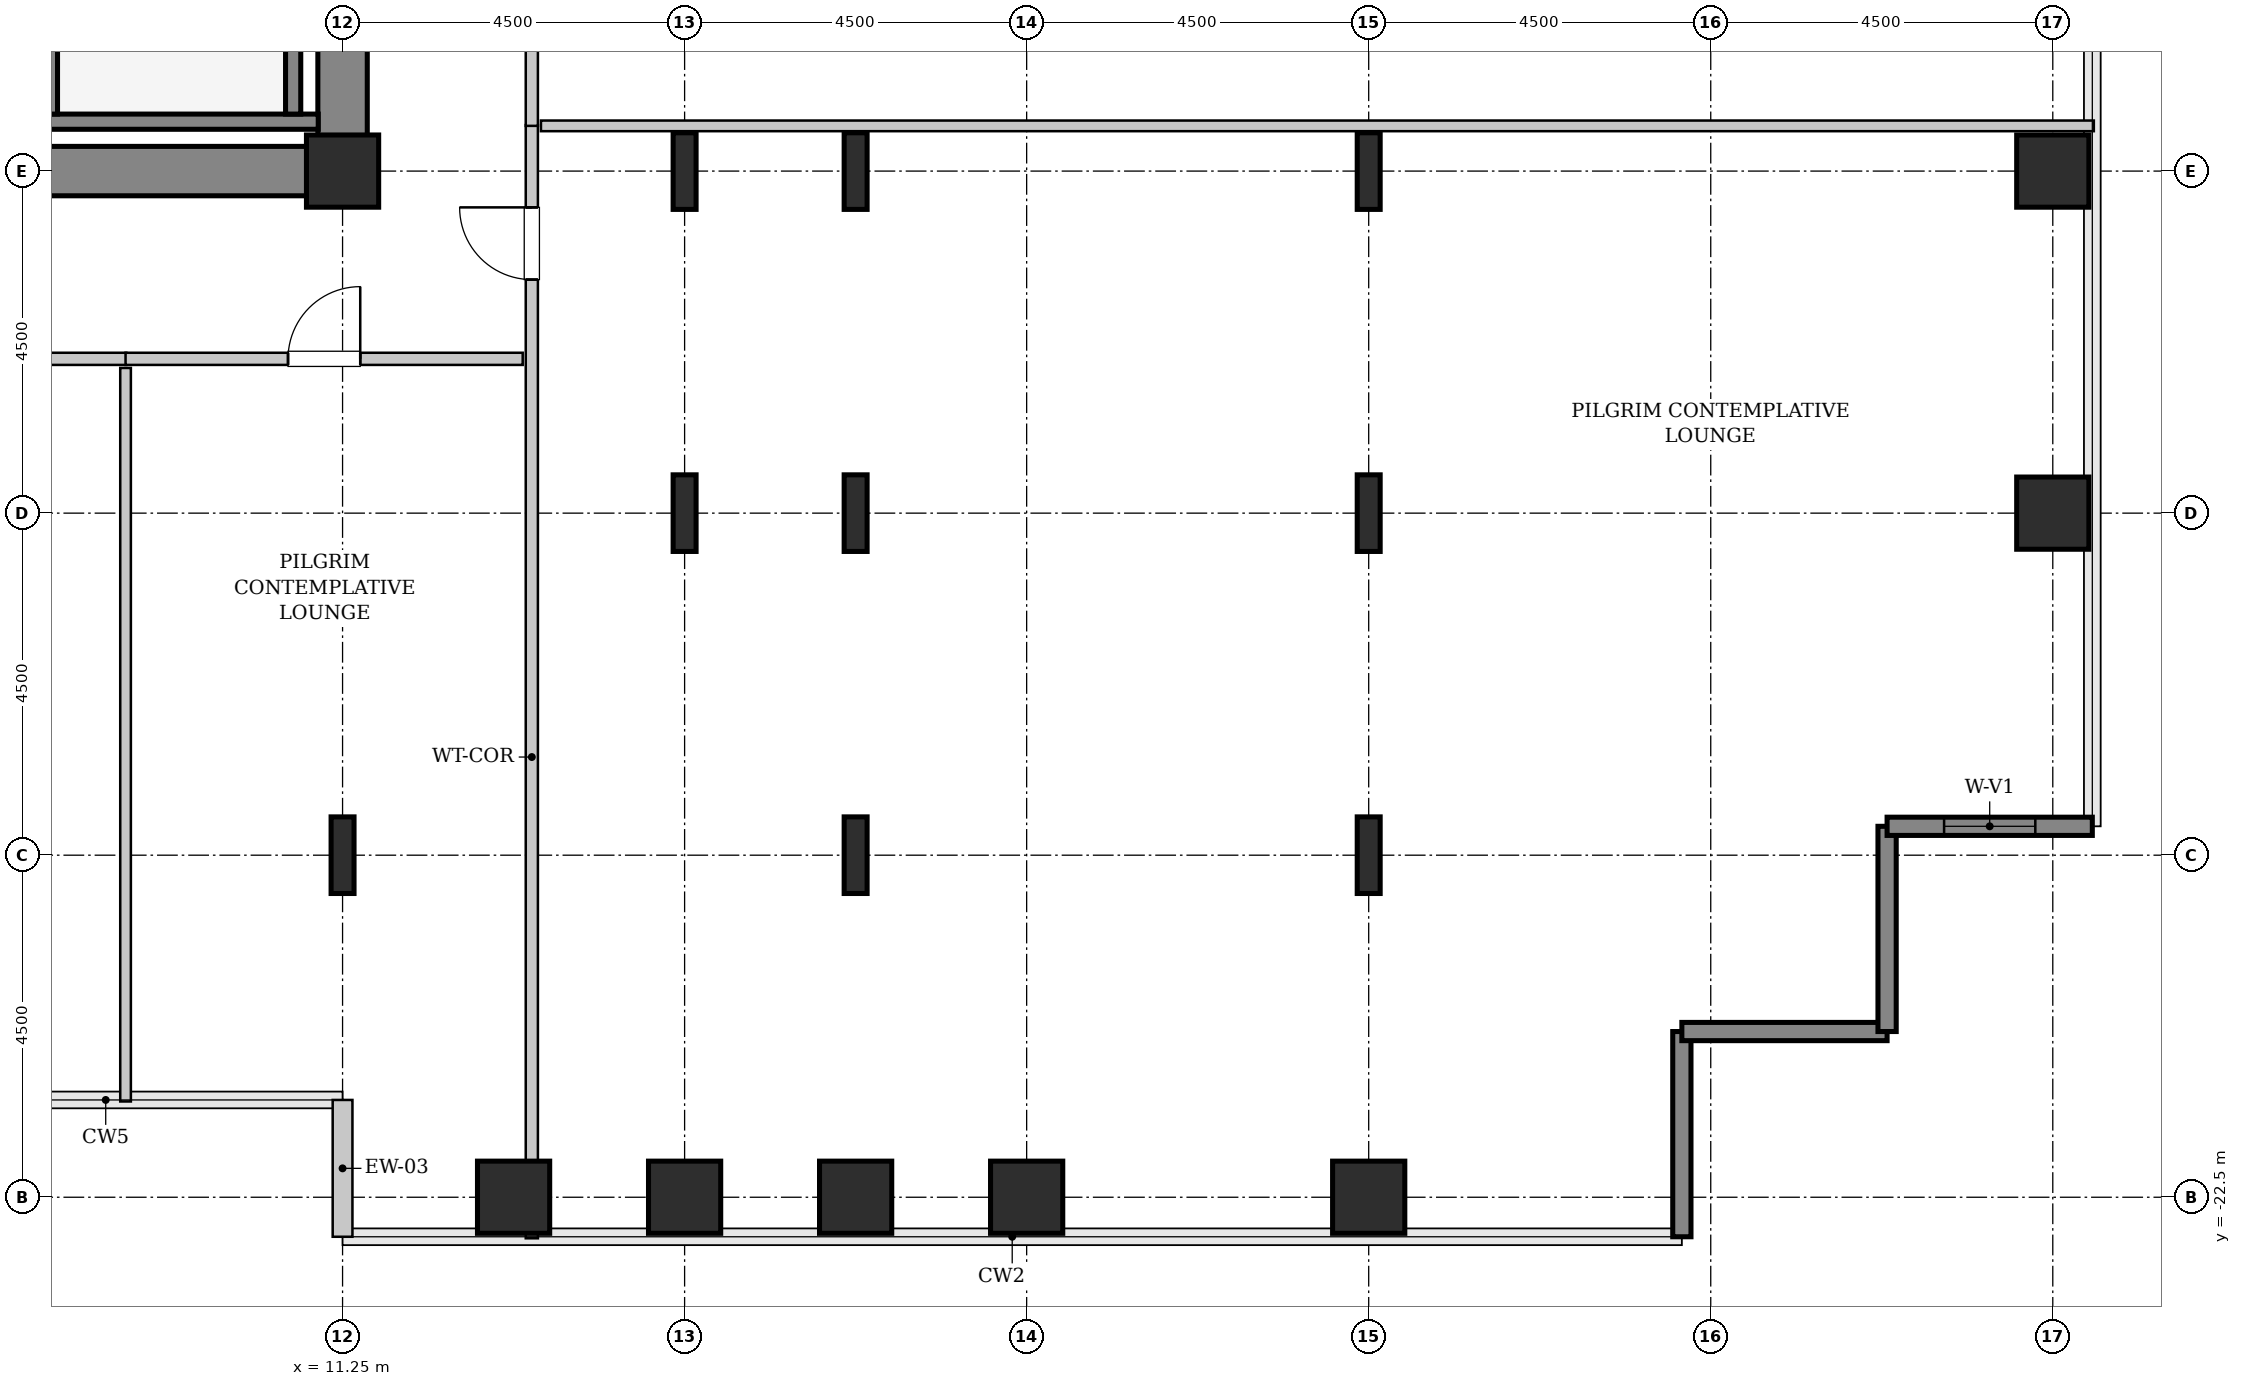
"""IFC4 building model, lengths in metres.
Left out: names, types, materials, properties, quantities, classifications, styles, units other than length and angle.
Written with IfcOpenShell. Run it as: python <this file> out.ifc"""

import sys

from ifc_helpers import new_model, si_unit, direction, frame, frame_2d, origin, origin_2d, place, context, subcontext, project, spatial, rectangle, hollow_rectangle, i_section, extrude, source, transform, mapped, element, fill, save


model = new_model("IFC4")
c1 = context("Model", 3, precision=1e-05, world=origin(), true_north=direction((0.0, 1.0)))
c2 = subcontext(c1, "Body", "Model", "MODEL_VIEW")
j1 = project(units=[si_unit("LENGTHUNIT", "METRE"), si_unit("PLANEANGLEUNIT", "RADIAN")], contexts=[c1])
p1 = place(None, origin())
s1 = spatial("IfcSite", under=j1, at=p1, CompositionType="ELEMENT")
p2 = place(p1, origin())
s2 = spatial("IfcBuilding", under=s1, at=p2, CompositionType="ELEMENT")
p3 = place(p2, frame((0.0, 0.0, 36.8)))
s3 = spatial("IfcBuildingStorey", under=s2, at=p3, CompositionType="ELEMENT", Elevation=36.8)
m1 = source(origin(), c2, "Body", "SweptSolid", [
    extrude(rectangle(XDim=10.025, YDim=0.65, at=frame_2d((5.012, 0.0))), origin(), (0.0, 0.0, 1.0), 3.8),
])
p4 = place(p3, frame((1.55, -9.0, 0.0), z_axis=(0.0, 0.0, 1.0), x_axis=(1.0, 0.0, 0.0)))
e1 = element("IfcWall", 1, at=p4, inside=s3, PredefinedType="SHEAR", context=c2, shape_type="MappedRepresentation", body=[
    mapped(m1, transform((0.0, 0.0, 0.0), x_axis=(1.0, 0.0, 0.0), y_axis=(0.0, 1.0, 0.0), z_axis=(0.0, 0.0, 1.0), scale=1.0)),
])
m2 = source(origin(), c2, "Body", "SweptSolid", [
    extrude(rectangle(XDim=7.325, YDim=0.65, at=frame_2d((3.663, 0.0))), origin(), (0.0, 0.0, 1.0), 3.8),
])
p5 = place(p3, frame((11.25, -8.675, 0.0), z_axis=(0.0, 0.0, 1.0), x_axis=(0.0, 1.0, 0.0)))
e2 = element("IfcWall", 2, at=p5, inside=s3, PredefinedType="SHEAR", context=c2, shape_type="MappedRepresentation", body=[
    mapped(m2, transform((0.0, 0.0, 0.0), x_axis=(1.0, 0.0, 0.0), y_axis=(0.0, 1.0, 0.0), z_axis=(0.0, 0.0, 1.0), scale=1.0)),
])
m3 = source(origin(), c2, "Body", "SweptSolid", [
    extrude(i_section(OverallWidth=0.302, OverallDepth=1.008, WebThickness=0.021, FlangeThickness=0.04, FilletRadius=0.03, at=origin_2d()), origin(), (0.0, 0.0, 1.0), 3.8),
])
p6 = place(p3, frame((11.25, -18.0, 0.0), z_axis=(0.0, 0.0, 1.0), x_axis=(1.0, 0.0, 0.0)))
e3 = element("IfcColumn", 3, at=p6, inside=s3, PredefinedType="COLUMN", context=c2, shape_type="MappedRepresentation", body=[
    mapped(m3, transform((0.0, 0.0, 0.0), x_axis=(1.0, 0.0, 0.0), y_axis=(0.0, 1.0, 0.0), z_axis=(0.0, 0.0, 1.0), scale=1.0)),
])
m4 = source(origin(), c2, "Body", "SweptSolid", [
    extrude(hollow_rectangle(XDim=0.95, YDim=0.95, WallThickness=0.045, InnerFilletRadius=0.045, OuterFilletRadius=0.09, at=origin_2d()), origin(), (0.0, 0.0, 1.0), 3.8),
])
p7 = place(p3, frame((11.25, -9.0, 0.0), z_axis=(0.0, 0.0, 1.0), x_axis=(1.0, 0.0, 0.0)))
e4 = element("IfcColumn", 4, at=p7, inside=s3, PredefinedType="COLUMN", context=c2, shape_type="MappedRepresentation", body=[
    mapped(m4, transform((0.0, 0.0, 0.0), x_axis=(1.0, 0.0, 0.0), y_axis=(0.0, 1.0, 0.0), z_axis=(0.0, 0.0, 1.0), scale=1.0)),
])
m5 = source(origin(), c2, "Body", "SweptSolid", [
    extrude(hollow_rectangle(XDim=0.95, YDim=0.95, WallThickness=0.045, InnerFilletRadius=0.045, OuterFilletRadius=0.09, at=origin_2d()), origin(), (0.0, 0.0, 1.0), 3.8),
])
for number, where, z_axis, x_axis in (
    (5, (13.5, -22.5, 0.0), (0.0, 0.0, 1.0), (1.0, 0.0, 0.0)),
    (6, (15.75, -22.5, 0.0), (0.0, 0.0, 1.0), (1.0, 0.0, 0.0)),
):
    element("IfcColumn", number, at=place(p3, frame(where, z_axis=z_axis, x_axis=x_axis)), inside=s3, PredefinedType="COLUMN", context=c2, shape_type="MappedRepresentation", body=[
        mapped(m5, transform((0.0, 0.0, 0.0), x_axis=(1.0, 0.0, 0.0), y_axis=(0.0, 1.0, 0.0), z_axis=(0.0, 0.0, 1.0), scale=1.0)),
    ])
for number, where, z_axis, x_axis in (
    (7, (15.75, -13.5, 0.0), (0.0, 0.0, 1.0), (1.0, 0.0, 0.0)),
    (8, (15.75, -9.0, 0.0), (0.0, 0.0, 1.0), (1.0, 0.0, 0.0)),
):
    element("IfcColumn", number, at=place(p3, frame(where, z_axis=z_axis, x_axis=x_axis)), inside=s3, PredefinedType="COLUMN", context=c2, shape_type="MappedRepresentation", body=[
        mapped(m3, transform((0.0, 0.0, 0.0), x_axis=(1.0, 0.0, 0.0), y_axis=(0.0, 1.0, 0.0), z_axis=(0.0, 0.0, 1.0), scale=1.0)),
    ])
p8 = place(p3, frame((18.0, -22.5, 0.0), z_axis=(0.0, 0.0, 1.0), x_axis=(1.0, 0.0, 0.0)))
e9 = element("IfcColumn", 9, at=p8, inside=s3, PredefinedType="COLUMN", context=c2, shape_type="MappedRepresentation", body=[
    mapped(m5, transform((0.0, 0.0, 0.0), x_axis=(1.0, 0.0, 0.0), y_axis=(0.0, 1.0, 0.0), z_axis=(0.0, 0.0, 1.0), scale=1.0)),
])
for number, where, z_axis, x_axis in (
    (10, (18.0, -18.0, 0.0), (0.0, 0.0, 1.0), (1.0, 0.0, 0.0)),
    (11, (18.0, -13.5, 0.0), (0.0, 0.0, 1.0), (1.0, 0.0, 0.0)),
    (12, (18.0, -9.0, 0.0), (0.0, 0.0, 1.0), (1.0, 0.0, 0.0)),
):
    element("IfcColumn", number, at=place(p3, frame(where, z_axis=z_axis, x_axis=x_axis)), inside=s3, PredefinedType="COLUMN", context=c2, shape_type="MappedRepresentation", body=[
        mapped(m3, transform((0.0, 0.0, 0.0), x_axis=(1.0, 0.0, 0.0), y_axis=(0.0, 1.0, 0.0), z_axis=(0.0, 0.0, 1.0), scale=1.0)),
    ])
for number, where, z_axis, x_axis in (
    (13, (20.25, -22.5, 0.0), (0.0, 0.0, 1.0), (1.0, 0.0, 0.0)),
    (14, (24.75, -22.5, 0.0), (0.0, 0.0, 1.0), (1.0, 0.0, 0.0)),
):
    element("IfcColumn", number, at=place(p3, frame(where, z_axis=z_axis, x_axis=x_axis)), inside=s3, PredefinedType="COLUMN", context=c2, shape_type="MappedRepresentation", body=[
        mapped(m5, transform((0.0, 0.0, 0.0), x_axis=(1.0, 0.0, 0.0), y_axis=(0.0, 1.0, 0.0), z_axis=(0.0, 0.0, 1.0), scale=1.0)),
    ])
for number, where, z_axis, x_axis in (
    (15, (24.75, -18.0, 0.0), (0.0, 0.0, 1.0), (1.0, 0.0, 0.0)),
    (16, (24.75, -13.5, 0.0), (0.0, 0.0, 1.0), (1.0, 0.0, 0.0)),
    (17, (24.75, -9.0, 0.0), (0.0, 0.0, 1.0), (1.0, 0.0, 0.0)),
):
    element("IfcColumn", number, at=place(p3, frame(where, z_axis=z_axis, x_axis=x_axis)), inside=s3, PredefinedType="COLUMN", context=c2, shape_type="MappedRepresentation", body=[
        mapped(m3, transform((0.0, 0.0, 0.0), x_axis=(1.0, 0.0, 0.0), y_axis=(0.0, 1.0, 0.0), z_axis=(0.0, 0.0, 1.0), scale=1.0)),
    ])
for number, where, z_axis, x_axis in (
    (18, (33.75, -13.5, 0.0), (0.0, 0.0, 1.0), (1.0, 0.0, 0.0)),
    (19, (33.75, -9.0, 0.0), (0.0, 0.0, 1.0), (1.0, 0.0, 0.0)),
):
    element("IfcColumn", number, at=place(p3, frame(where, z_axis=z_axis, x_axis=x_axis)), inside=s3, PredefinedType="COLUMN", context=c2, shape_type="MappedRepresentation", body=[
        mapped(m5, transform((0.0, 0.0, 0.0), x_axis=(1.0, 0.0, 0.0), y_axis=(0.0, 1.0, 0.0), z_axis=(0.0, 0.0, 1.0), scale=1.0)),
    ])
m6 = source(origin(), c2, "Body", "SweptSolid", [
    extrude(rectangle(XDim=1.8, YDim=0.26, at=frame_2d((0.9, 0.0))), origin(), (0.0, 0.0, 1.0), 3.55),
])
p9 = place(p3, frame((11.25, -21.22, 0.0), z_axis=(0.0, 0.0, 1.0), x_axis=(0.0, -1.0, 0.0)))
e20 = element("IfcWall", 20, at=p9, inside=s3, PredefinedType="SOLIDWALL", context=c2, shape_type="MappedRepresentation", body=[
    mapped(m6, transform((0.0, 0.0, 0.0), x_axis=(1.0, 0.0, 0.0), y_axis=(0.0, 1.0, 0.0), z_axis=(0.0, 0.0, 1.0), scale=1.0)),
])
m7 = source(origin(), c2, "Body", "SweptSolid", [
    extrude(rectangle(XDim=2.7, YDim=0.24, at=frame_2d((1.35, 0.0))), origin(), (0.0, 0.0, 1.0), 3.55),
])
for number, where, z_axis, x_axis in (
    (21, (28.87, -23.02, 0.0), (0.0, 0.0, 1.0), (0.0, 1.0, 0.0)),
    (22, (28.87, -20.32, 0.0), (0.0, 0.0, 1.0), (1.0, 0.0, 0.0)),
    (23, (31.57, -20.32, 0.0), (0.0, 0.0, 1.0), (0.0, 1.0, 0.0)),
):
    element("IfcWall", number, at=place(p3, frame(where, z_axis=z_axis, x_axis=x_axis)), inside=s3, PredefinedType="SHEAR", context=c2, shape_type="MappedRepresentation", body=[
        mapped(m7, transform((0.0, 0.0, 0.0), x_axis=(1.0, 0.0, 0.0), y_axis=(0.0, 1.0, 0.0), z_axis=(0.0, 0.0, 1.0), scale=1.0)),
    ])
p10 = place(p3, frame((31.57, -17.62, 0.0), z_axis=(0.0, 0.0, 1.0), x_axis=(1.0, 0.0, 0.0)))
e24 = element("IfcWall", 24, at=p10, inside=s3, PredefinedType="SHEAR", context=c2, shape_type="MappedRepresentation", body=[
    mapped(m7, transform((0.0, 0.0, 0.0), x_axis=(1.0, 0.0, 0.0), y_axis=(0.0, 1.0, 0.0), z_axis=(0.0, 0.0, 1.0), scale=1.0)),
])
p11 = place(p10, frame((0.75, 0.0, 0.85)))
e25 = element("IfcOpeningElement", 25, at=p11, cuts=e24, PredefinedType="OPENING", context=c2, shape_type="SweptSolid", body=[
    extrude(rectangle(XDim=1.2, YDim=1.8, at=frame_2d((0.6, 0.9))), frame((0.0, 0.13, 0.0), z_axis=(0.0, -1.0, 0.0), x_axis=(1.0, 0.0, 0.0)), (0.0, 0.0, 1.0), 0.26),
])
m8 = source(origin(), c2, "Body", "SweptSolid", [
    extrude(rectangle(XDim=3.63, YDim=0.2, at=frame_2d((1.815, 0.0))), origin(), (0.0, 0.0, 1.0), 3.8),
])
p12 = place(p3, frame((7.3, -8.35, 0.0), z_axis=(0.0, 0.0, 1.0), x_axis=(1.0, 0.0, 0.0)))
e26 = element("IfcWall", 26, at=p12, inside=s3, PredefinedType="SOLIDWALL", context=c2, shape_type="MappedRepresentation", body=[
    mapped(m8, transform((0.0, 0.0, 0.0), x_axis=(1.0, 0.0, 0.0), y_axis=(0.0, 1.0, 0.0), z_axis=(0.0, 0.0, 1.0), scale=1.0)),
])
m9 = source(origin(), c2, "Body", "SweptSolid", [
    extrude(rectangle(XDim=7.1, YDim=0.2, at=frame_2d((3.55, 0.0))), origin(), (0.0, 0.0, 1.0), 3.8),
])
p13 = place(p3, frame((7.4, -1.15, 0.0), z_axis=(0.0, 0.0, 1.0), x_axis=(0.0, -1.0, 0.0)))
e27 = element("IfcWall", 27, at=p13, inside=s3, PredefinedType="SOLIDWALL", context=c2, shape_type="MappedRepresentation", body=[
    mapped(m9, transform((0.0, 0.0, 0.0), x_axis=(1.0, 0.0, 0.0), y_axis=(0.0, 1.0, 0.0), z_axis=(0.0, 0.0, 1.0), scale=1.0)),
])
p14 = place(p13, frame((0.18, 0.0, 0.0)))
e28 = element("IfcOpeningElement", 28, at=p14, cuts=e27, PredefinedType="OPENING", context=c2, shape_type="SweptSolid", body=[
    extrude(rectangle(XDim=1.1, YDim=2.15, at=frame_2d((0.55, 1.075))), frame((0.0, 0.11, 0.0), z_axis=(0.0, -1.0, 0.0), x_axis=(1.0, 0.0, 0.0)), (0.0, 0.0, 1.0), 0.22),
])
p15 = place(p3, frame((10.6, -1.15, 0.0), z_axis=(0.0, 0.0, 1.0), x_axis=(0.0, -1.0, 0.0)))
e29 = element("IfcWall", 29, at=p15, inside=s3, PredefinedType="SOLIDWALL", context=c2, shape_type="MappedRepresentation", body=[
    mapped(m9, transform((0.0, 0.0, 0.0), x_axis=(1.0, 0.0, 0.0), y_axis=(0.0, 1.0, 0.0), z_axis=(0.0, 0.0, 1.0), scale=1.0)),
])
m10 = source(origin(), c2, "Body", "SweptSolid", [
    extrude(rectangle(XDim=14.645, YDim=0.16, at=frame_2d((7.323, 0.0))), origin(), (0.0, 0.0, 1.0), 3.535),
])
p16 = place(p3, frame((13.74, -23.04, 0.0), z_axis=(0.0, 0.0, 1.0), x_axis=(0.0, 1.0, 0.0)))
e30 = element("IfcWall", 30, at=p16, inside=s3, PredefinedType="PARTITIONING", context=c2, shape_type="MappedRepresentation", body=[
    mapped(m10, transform((0.0, 0.0, 0.0), x_axis=(1.0, 0.0, 0.0), y_axis=(0.0, 1.0, 0.0), z_axis=(0.0, 0.0, 1.0), scale=1.0)),
])
p17 = place(p16, frame((12.613, 0.0, 0.0)))
e31 = element("IfcOpeningElement", 31, at=p17, cuts=e30, PredefinedType="OPENING", context=c2, shape_type="SweptSolid", body=[
    extrude(rectangle(XDim=0.95, YDim=2.1, at=frame_2d((0.475, 1.05))), frame((0.0, 0.09, 0.0), z_axis=(0.0, -1.0, 0.0), x_axis=(1.0, 0.0, 0.0)), (0.0, 0.0, 1.0), 0.18),
])
m11 = source(origin(), c2, "Body", "SweptSolid", [
    extrude(rectangle(XDim=20.43, YDim=0.14, at=frame_2d((10.215, 0.0))), origin(), (0.0, 0.0, 1.0), 3.535),
])
p18 = place(p3, frame((13.86, -8.405, 0.0), z_axis=(0.0, 0.0, 1.0), x_axis=(1.0, 0.0, 0.0)))
e32 = element("IfcWall", 32, at=p18, inside=s3, PredefinedType="PARTITIONING", context=c2, shape_type="MappedRepresentation", body=[
    mapped(m11, transform((0.0, 0.0, 0.0), x_axis=(1.0, 0.0, 0.0), y_axis=(0.0, 1.0, 0.0), z_axis=(0.0, 0.0, 1.0), scale=1.0)),
])
m12 = source(origin(), c2, "Body", "SweptSolid", [
    extrude(rectangle(XDim=3.61, YDim=0.16, at=frame_2d((1.805, 0.0))), origin(), (0.0, 0.0, 1.0), 3.535),
])
p19 = place(p3, frame((13.74, -8.405, 0.0), z_axis=(0.0, 0.0, 1.0), x_axis=(0.0, 1.0, 0.0)))
e33 = element("IfcWall", 33, at=p19, inside=s3, PredefinedType="PARTITIONING", context=c2, shape_type="MappedRepresentation", body=[
    mapped(m12, transform((0.0, 0.0, 0.0), x_axis=(1.0, 0.0, 0.0), y_axis=(0.0, 1.0, 0.0), z_axis=(0.0, 0.0, 1.0), scale=1.0)),
])
p20 = place(p19, frame((1.33, 0.0, 0.0)))
e34 = element("IfcOpeningElement", 34, at=p20, cuts=e33, PredefinedType="OPENING", context=c2, shape_type="SweptSolid", body=[
    extrude(rectangle(XDim=0.95, YDim=2.1, at=frame_2d((0.475, 1.05))), frame((0.0, 0.09, 0.0), z_axis=(0.0, -1.0, 0.0), x_axis=(1.0, 0.0, 0.0)), (0.0, 0.0, 1.0), 0.18),
])
m13 = source(origin(), c2, "Body", "SweptSolid", [
    extrude(rectangle(XDim=5.81, YDim=0.16, at=frame_2d((2.905, 0.0))), origin(), (0.0, 0.0, 1.0), 3.535),
])
p21 = place(p3, frame((2.595, -11.47, 0.0), z_axis=(0.0, 0.0, 1.0), x_axis=(1.0, 0.0, 0.0)))
e35 = element("IfcWall", 35, at=p21, inside=s3, PredefinedType="PARTITIONING", context=c2, shape_type="MappedRepresentation", body=[
    mapped(m13, transform((0.0, 0.0, 0.0), x_axis=(1.0, 0.0, 0.0), y_axis=(0.0, 1.0, 0.0), z_axis=(0.0, 0.0, 1.0), scale=1.0)),
])
p22 = place(p21, frame((2.43, 0.0, 0.0)))
e36 = element("IfcOpeningElement", 36, at=p22, cuts=e35, PredefinedType="OPENING", context=c2, shape_type="SweptSolid", body=[
    extrude(rectangle(XDim=0.95, YDim=2.1, at=frame_2d((0.475, 1.05))), frame((0.0, 0.09, 0.0), z_axis=(0.0, -1.0, 0.0), x_axis=(1.0, 0.0, 0.0)), (0.0, 0.0, 1.0), 0.18),
])
m14 = source(origin(), c2, "Body", "SweptSolid", [
    extrude(rectangle(XDim=9.65, YDim=0.14, at=frame_2d((4.825, 0.0))), origin(), (0.0, 0.0, 1.0), 3.535),
])
p23 = place(p3, frame((8.395, -21.24, 0.0), z_axis=(0.0, 0.0, 1.0), x_axis=(0.0, 1.0, 0.0)))
e37 = element("IfcWall", 37, at=p23, inside=s3, PredefinedType="PARTITIONING", context=c2, shape_type="MappedRepresentation", body=[
    mapped(m14, transform((0.0, 0.0, 0.0), x_axis=(1.0, 0.0, 0.0), y_axis=(0.0, 1.0, 0.0), z_axis=(0.0, 0.0, 1.0), scale=1.0)),
])
m15 = source(origin(), c2, "Body", "SweptSolid", [
    extrude(rectangle(XDim=5.225, YDim=0.16, at=frame_2d((2.613, 0.0))), origin(), (0.0, 0.0, 1.0), 3.535),
])
p24 = place(p3, frame((8.395, -11.47, 0.0), z_axis=(0.0, 0.0, 1.0), x_axis=(1.0, 0.0, 0.0)))
e38 = element("IfcWall", 38, at=p24, inside=s3, PredefinedType="PARTITIONING", context=c2, shape_type="MappedRepresentation", body=[
    mapped(m15, transform((0.0, 0.0, 0.0), x_axis=(1.0, 0.0, 0.0), y_axis=(0.0, 1.0, 0.0), z_axis=(0.0, 0.0, 1.0), scale=1.0)),
])
p25 = place(p24, frame((2.137, 0.0, 0.0)))
e39 = element("IfcOpeningElement", 39, at=p25, cuts=e38, PredefinedType="OPENING", context=c2, shape_type="SweptSolid", body=[
    extrude(rectangle(XDim=0.95, YDim=2.1, at=frame_2d((0.475, 1.05))), frame((0.0, 0.09, 0.0), z_axis=(0.0, -1.0, 0.0), x_axis=(1.0, 0.0, 0.0)), (0.0, 0.0, 1.0), 0.18),
])
m16 = source(origin(), c2, "Body", "SweptSolid", [
    extrude(rectangle(XDim=1.2, YDim=1.8, at=frame_2d((0.6, 0.9))), frame((0.0, 0.03, 0.0), z_axis=(0.0, -1.0, 0.0), x_axis=(1.0, 0.0, 0.0)), (0.0, 0.0, 1.0), 0.06),
])
p26 = place(p11, origin())
e40 = element("IfcWindow", 40, at=p26, inside=s3, PartitioningType="SINGLE_PANEL", PredefinedType="WINDOW", context=c2, shape_type="MappedRepresentation", body=[
    mapped(m16, transform((0.0, 0.0, 0.0), x_axis=(1.0, 0.0, 0.0), y_axis=(0.0, 1.0, 0.0), z_axis=(0.0, 0.0, 1.0), scale=1.0)),
])
fill(e25, e40)
m17 = source(origin(), c2, "Body", "SweptSolid", [
    extrude(rectangle(XDim=0.95, YDim=2.1, at=frame_2d((0.475, 1.05))), frame((0.0, 0.025, 0.0), z_axis=(0.0, -1.0, 0.0), x_axis=(1.0, 0.0, 0.0)), (0.0, 0.0, 1.0), 0.05),
])
p27 = place(p17, origin())
e41 = element("IfcDoor", 41, at=p27, inside=s3, OperationType="SINGLE_SWING_RIGHT", PredefinedType="DOOR", context=c2, shape_type="MappedRepresentation", body=[
    mapped(m17, transform((0.0, 0.0, 0.0), x_axis=(1.0, 0.0, 0.0), y_axis=(0.0, 1.0, 0.0), z_axis=(0.0, 0.0, 1.0), scale=1.0)),
])
fill(e31, e41)
p28 = place(p25, origin())
e42 = element("IfcDoor", 42, at=p28, inside=s3, OperationType="SINGLE_SWING_RIGHT", PredefinedType="DOOR", context=c2, shape_type="MappedRepresentation", body=[
    mapped(m17, transform((0.0, 0.0, 0.0), x_axis=(1.0, 0.0, 0.0), y_axis=(0.0, 1.0, 0.0), z_axis=(0.0, 0.0, 1.0), scale=1.0)),
])
fill(e39, e42)
save(model, sys.argv[1])
